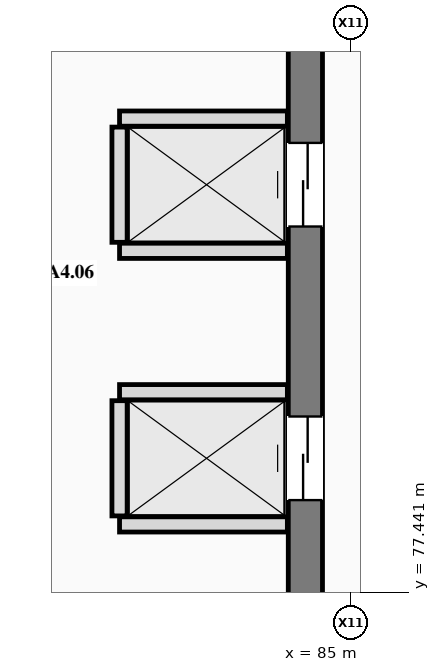
"""IFC4 building model, lengths in metres.
Left out: names, types, materials, properties, quantities, classifications, styles, units other than length and angle.
Written with IfcOpenShell. Run it as: python <this file> out.ifc"""

import sys

from ifc_helpers import new_model, si_unit, direction, frame, frame_2d, origin, place, context, subcontext, project, spatial, rectangle, extrude, element, fill, save


model = new_model("IFC4")
c1 = context("Model", 3, precision=1e-05, world=origin(), true_north=direction((0.0, 1.0)))
c2 = subcontext(c1, "Body", "Model", "MODEL_VIEW")
j1 = project(units=[si_unit("LENGTHUNIT", "METRE"), si_unit("PLANEANGLEUNIT", "RADIAN")], contexts=[c1])
p1 = place(None, origin())
s1 = spatial("IfcSite", under=j1, at=p1, CompositionType="ELEMENT")
p2 = place(p1, origin())
s2 = spatial("IfcBuilding", under=s1, at=p2, CompositionType="ELEMENT")
p3 = place(p2, frame((0.0, 0.0, -4.5)))
s3 = spatial("IfcBuildingStorey", under=s2, at=p3, CompositionType="ELEMENT", Elevation=-4.5)
p4 = place(p3, frame((84.4, 76.625, 0.0), z_axis=(0.0, 0.0, 1.0), x_axis=(0.0, 1.0, 0.0)))
e1 = element("IfcWall", 1, at=p4, inside=s3, PredefinedType="SHEAR", context=c2, shape_type="SweptSolid", body=[
    extrude(rectangle(XDim=9.35, YDim=0.45, at=frame_2d((4.675, 0.0))), origin(), (0.0, 0.0, 1.0), 4.5),
])
p5 = place(p4, frame((2.025, 0.0, 0.0)))
e2 = element("IfcOpeningElement", 2, at=p5, cuts=e1, PredefinedType="OPENING", context=c2, shape_type="SweptSolid", body=[
    extrude(rectangle(XDim=1.1, YDim=2.2, at=frame_2d((0.55, 1.1))), frame((0.0, 0.235, 0.0), z_axis=(0.0, -1.0, 0.0), x_axis=(1.0, 0.0, 0.0)), (0.0, 0.0, 1.0), 0.47),
])
p6 = place(p4, frame((5.625, 0.0, 0.0)))
e3 = element("IfcOpeningElement", 3, at=p6, cuts=e1, PredefinedType="OPENING", context=c2, shape_type="SweptSolid", body=[
    extrude(rectangle(XDim=1.1, YDim=2.2, at=frame_2d((0.55, 1.1))), frame((0.0, 0.235, 0.0), z_axis=(0.0, -1.0, 0.0), x_axis=(1.0, 0.0, 0.0)), (0.0, 0.0, 1.0), 0.47),
])
for number, where, z_axis, x_axis in (
    (4, (81.955, 78.33, 0.0), (0.0, 0.0, 1.0), (1.0, 0.0, 0.0)),
    (5, (81.955, 80.07, 0.0), (0.0, 0.0, 1.0), (1.0, 0.0, 0.0)),
):
    element("IfcWall", number, at=place(p3, frame(where, z_axis=z_axis, x_axis=x_axis)), inside=s3, PredefinedType="PLUMBINGWALL", context=c2, shape_type="SweptSolid", body=[
        extrude(rectangle(XDim=2.208, YDim=0.2, at=frame_2d((1.104, 0.0))), origin(), (0.0, 0.0, 1.0), 4.175),
    ])
p7 = place(p3, frame((81.955, 78.442, 0.0), z_axis=(0.0, 0.0, 1.0), x_axis=(0.0, 1.0, 0.0)))
e6 = element("IfcWall", 6, at=p7, inside=s3, PredefinedType="PLUMBINGWALL", context=c2, shape_type="SweptSolid", body=[
    extrude(rectangle(XDim=1.516, YDim=0.2, at=frame_2d((0.758, 0.0))), origin(), (0.0, 0.0, 1.0), 4.175),
])
for number, where, z_axis, x_axis in (
    (7, (81.955, 81.93, 0.0), (0.0, 0.0, 1.0), (1.0, 0.0, 0.0)),
    (8, (81.955, 83.67, 0.0), (0.0, 0.0, 1.0), (1.0, 0.0, 0.0)),
):
    element("IfcWall", number, at=place(p3, frame(where, z_axis=z_axis, x_axis=x_axis)), inside=s3, PredefinedType="PLUMBINGWALL", context=c2, shape_type="SweptSolid", body=[
        extrude(rectangle(XDim=2.208, YDim=0.2, at=frame_2d((1.104, 0.0))), origin(), (0.0, 0.0, 1.0), 4.175),
    ])
p8 = place(p3, frame((81.955, 82.042, 0.0), z_axis=(0.0, 0.0, 1.0), x_axis=(0.0, 1.0, 0.0)))
e9 = element("IfcWall", 9, at=p8, inside=s3, PredefinedType="PLUMBINGWALL", context=c2, shape_type="SweptSolid", body=[
    extrude(rectangle(XDim=1.516, YDim=0.2, at=frame_2d((0.758, 0.0))), origin(), (0.0, 0.0, 1.0), 4.175),
])
p9 = place(p5, origin())
e10 = element("IfcDoor", 10, at=p9, inside=s3, OperationType="SLIDING_TO_LEFT", PredefinedType="DOOR", context=c2, shape_type="SweptSolid", body=[
    extrude(rectangle(XDim=1.1, YDim=2.2, at=frame_2d((0.55, 1.1))), frame((0.0, 0.025, 0.0), z_axis=(0.0, -1.0, 0.0), x_axis=(1.0, 0.0, 0.0)), (0.0, 0.0, 1.0), 0.05),
])
fill(e2, e10)
p10 = place(p6, origin())
e11 = element("IfcDoor", 11, at=p10, inside=s3, OperationType="SLIDING_TO_RIGHT", PredefinedType="DOOR", context=c2, shape_type="SweptSolid", body=[
    extrude(rectangle(XDim=1.1, YDim=2.2, at=frame_2d((0.55, 1.1))), frame((0.0, 0.025, 0.0), z_axis=(0.0, -1.0, 0.0), x_axis=(1.0, 0.0, 0.0)), (0.0, 0.0, 1.0), 0.05),
])
fill(e3, e11)
save(model, sys.argv[1])
